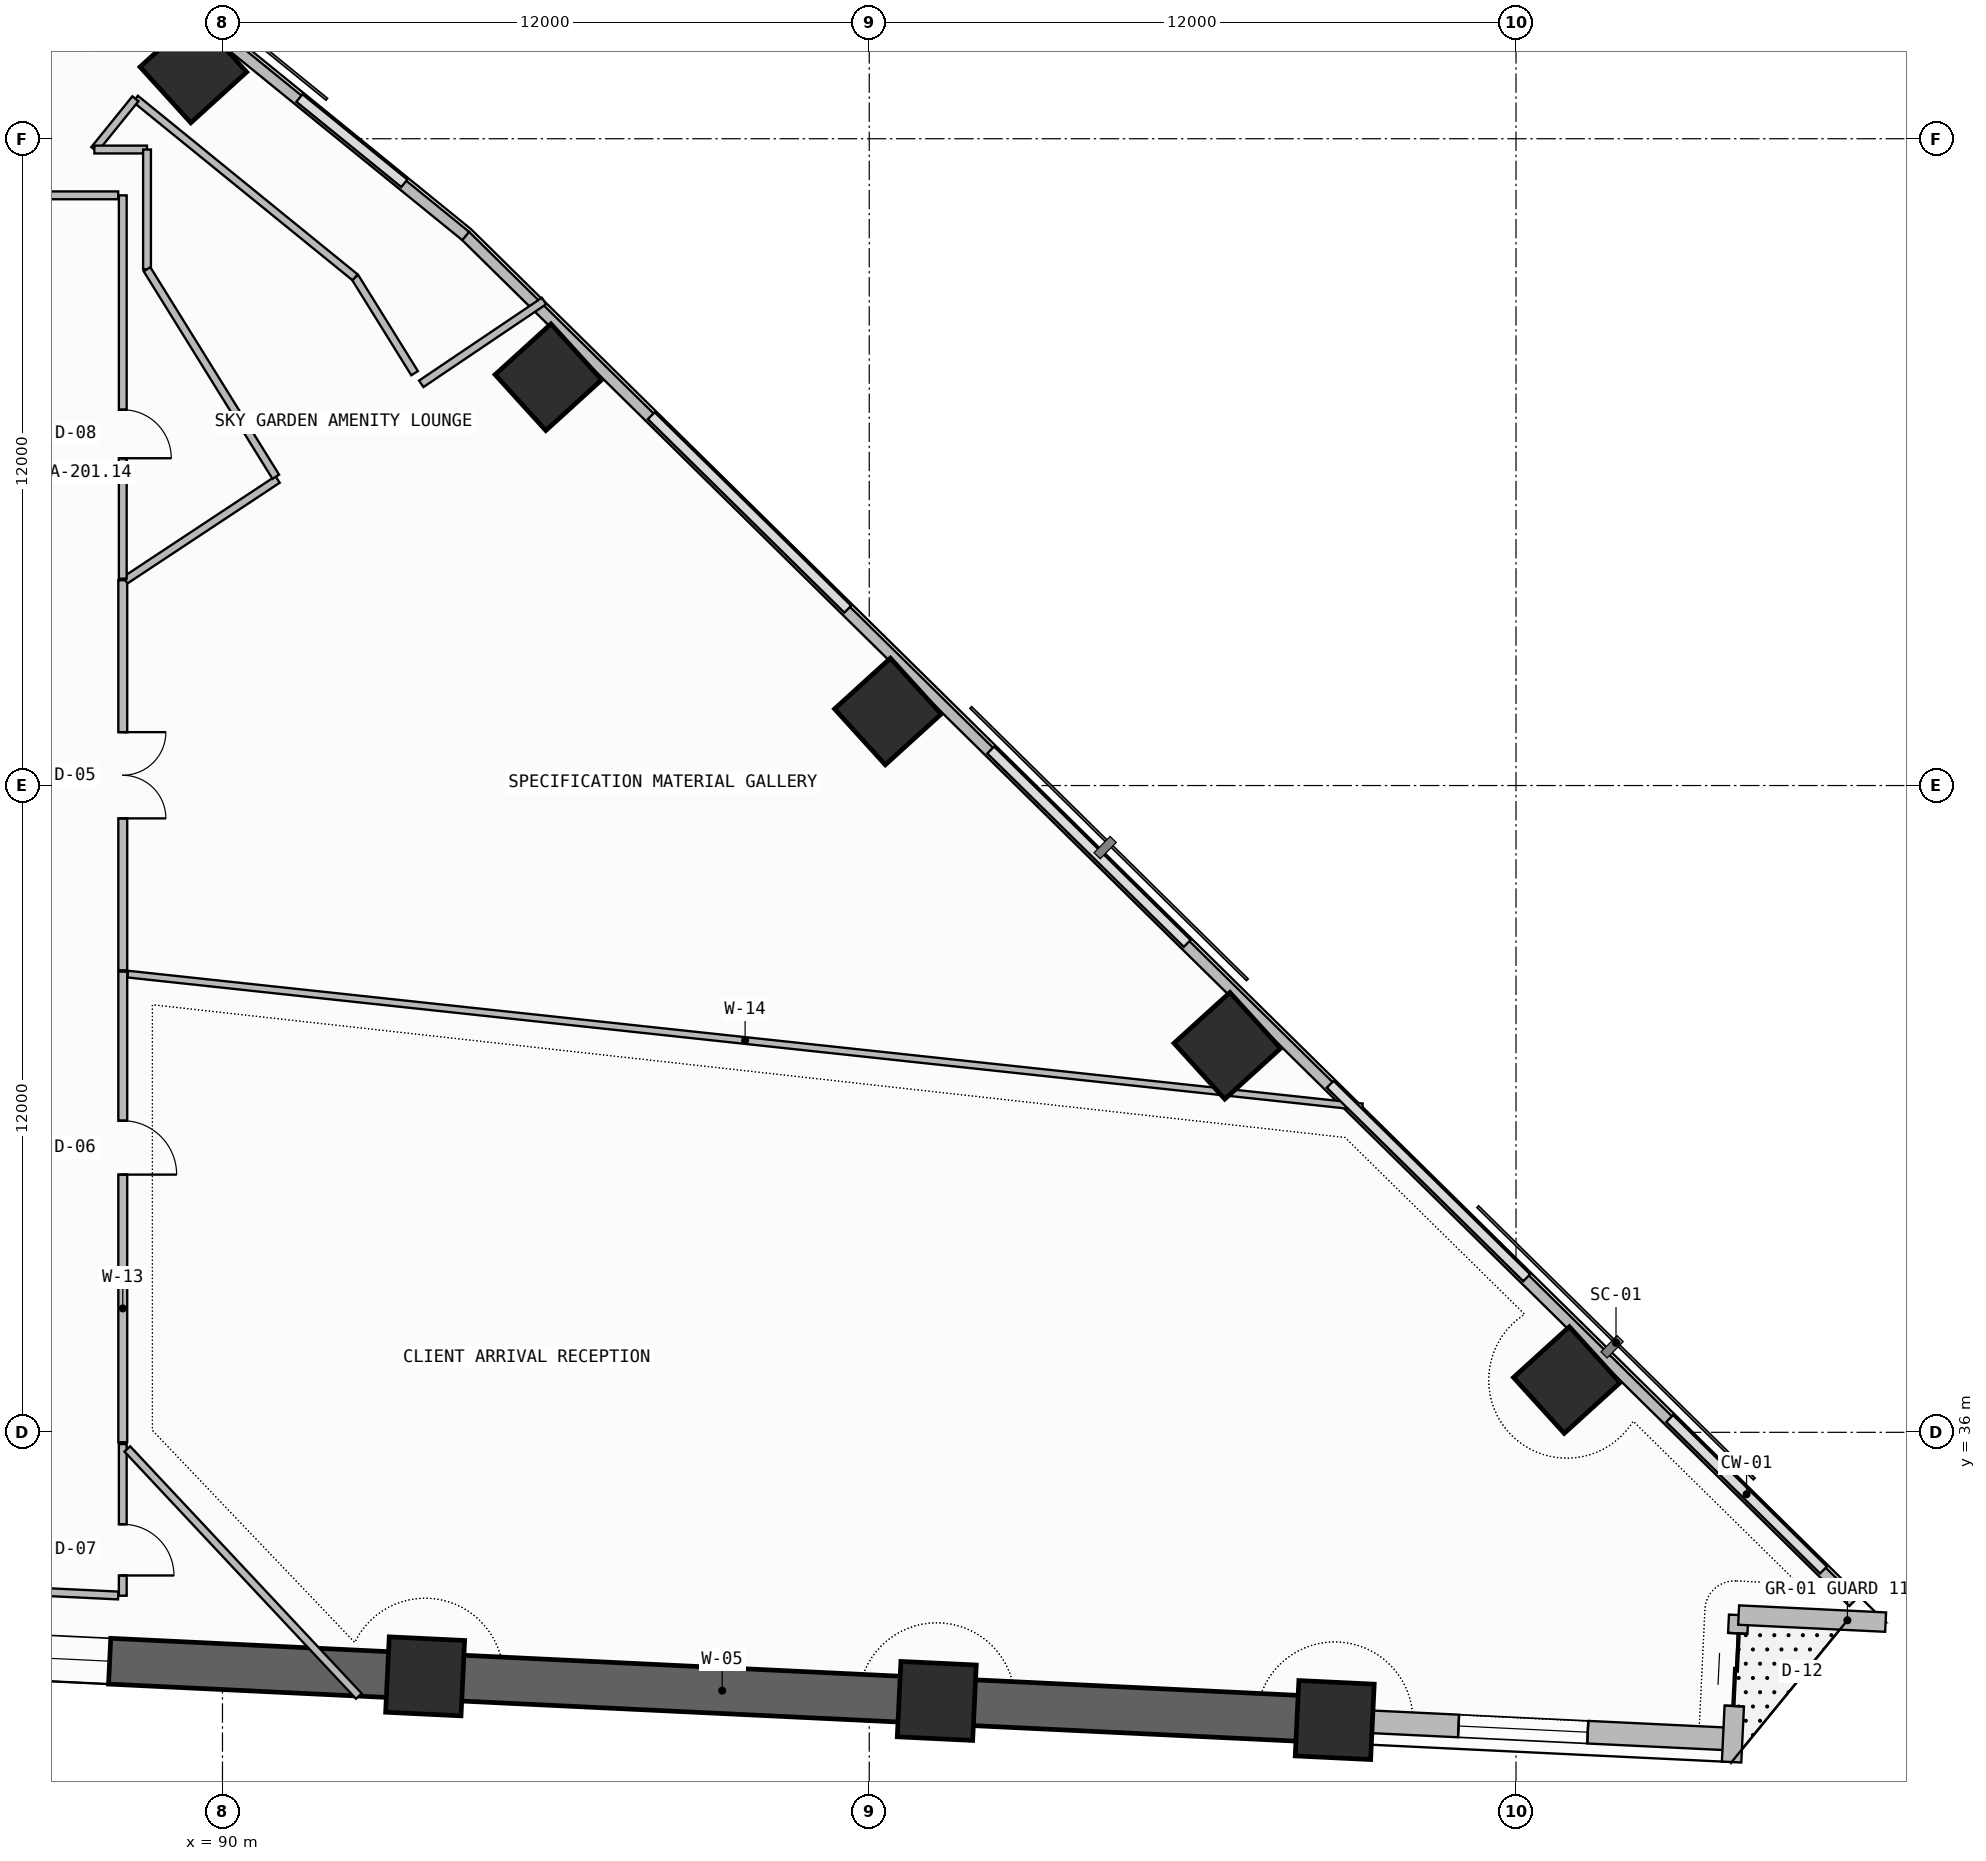
"""IFC4 building model, lengths in metres.
Left out: names, types, materials, properties, quantities, classifications, styles, units other than length and angle.
Written with IfcOpenShell. Run it as: python <this file> out.ifc"""

import sys

from ifc_helpers import new_model, si_unit, direction, frame, frame_2d, origin, origin_2d, place, context, subcontext, project, spatial, rectangle, extrude, element, fill, save


model = new_model("IFC4")
c1 = context("Model", 3, precision=1e-05, world=origin(), true_north=direction((0.0, 1.0)))
c2 = subcontext(c1, "Body", "Model", "MODEL_VIEW")
j1 = project(units=[si_unit("LENGTHUNIT", "METRE"), si_unit("PLANEANGLEUNIT", "RADIAN")], contexts=[c1])
p1 = place(None, origin())
s1 = spatial("IfcSite", under=j1, at=p1, CompositionType="ELEMENT")
p2 = place(p1, origin())
s2 = spatial("IfcBuilding", under=s1, at=p2, CompositionType="ELEMENT")
p3 = place(p2, frame((0.0, 0.0, 48.3)))
s3 = spatial("IfcBuildingStorey", under=s2, at=p3, CompositionType="ELEMENT", Elevation=48.3)
for number, where, z_axis, x_axis in (
    (1, (93.76, 31.472, 0.0), (0.0, 0.0, 1.0), (-0.999, 0.048, 0.0)),
    (2, (103.253, 31.017, 0.0), (0.0, 0.0, 1.0), (-0.999, 0.048, 0.0)),
    (3, (110.636, 30.662, 0.0), (0.0, 0.0, 1.0), (-0.999, 0.048, 0.0)),
    (4, (114.942, 36.97, 0.0), (0.0, 0.0, 1.0), (0.74, 0.672, 0.0)),
    (5, (108.644, 43.172, 0.0), (0.0, 0.0, 1.0), (0.74, 0.672, 0.0)),
    (6, (102.345, 49.374, 0.0), (0.0, 0.0, 1.0), (0.74, 0.672, 0.0)),
    (7, (96.047, 55.576, 0.0), (0.0, 0.0, 1.0), (0.74, 0.672, 0.0)),
    (8, (89.46, 61.285, 0.0), (0.0, 0.0, 1.0), (0.74, 0.672, 0.0)),
):
    element("IfcColumn", number, at=place(p3, frame(where, z_axis=z_axis, x_axis=x_axis)), inside=s3, PredefinedType="COLUMN", context=c2, shape_type="SweptSolid", body=[
        extrude(rectangle(XDim=1.4, YDim=1.4, at=origin_2d()), origin(), (0.0, 0.0, 1.0), 3.6),
    ])
p4 = place(p3, frame((83.212, 31.979, -0.26), z_axis=(0.0, 0.0, 1.0), x_axis=(0.998848235141, -0.047981279227, 0.0)))
e9 = element("IfcWall", 9, at=p4, inside=s3, PredefinedType="SHEAR", context=c2, shape_type="SweptSolid", body=[
    extrude(rectangle(XDim=27.456, YDim=0.85, at=frame_2d((13.728, 0.0))), origin(), (0.0, 0.0, 1.0), 3.66),
])
p5 = place(p4, frame((2.3, 0.0, 1.2)))
e10 = element("IfcOpeningElement", 10, at=p5, cuts=e9, PredefinedType="OPENING", context=c2, shape_type="SweptSolid", body=[
    extrude(rectangle(XDim=2.4, YDim=0.9, at=frame_2d((1.2, 0.45))), frame((0.0, 0.435, 0.0), z_axis=(0.0, -1.0, 0.0), x_axis=(1.0, 0.0, 0.0)), (0.0, 0.0, 1.0), 0.87),
])
p6 = place(p3, frame((110.636, 30.662, 0.0), z_axis=(0.0, 0.0, 1.0), x_axis=(0.998847872759, -0.047988822508, 0.0)))
e11 = element("IfcWall", 11, at=p6, inside=s3, PredefinedType="SOLIDWALL", context=c2, shape_type="SweptSolid", body=[
    extrude(rectangle(XDim=7.392, YDim=0.42, at=frame_2d((3.696, 0.0))), origin(), (0.0, 0.0, 1.0), 2.385),
])
p7 = place(p6, frame((2.3, 0.0, 1.2)))
e12 = element("IfcOpeningElement", 12, at=p7, cuts=e11, PredefinedType="OPENING", context=c2, shape_type="SweptSolid", body=[
    extrude(rectangle(XDim=2.4, YDim=0.9, at=frame_2d((1.2, 0.45))), frame((0.0, 0.22, 0.0), z_axis=(0.0, -1.0, 0.0), x_axis=(1.0, 0.0, 0.0)), (0.0, 0.0, 1.0), 0.44),
])
p8 = place(p3, frame((118.0, 29.883, 0.0), z_axis=(0.0, 0.0, 1.0), x_axis=(0.048024030708, 0.998846180588, 0.0)))
e13 = element("IfcWall", 13, at=p8, inside=s3, PredefinedType="SOLIDWALL", context=c2, shape_type="SweptSolid", body=[
    extrude(rectangle(XDim=2.73, YDim=0.36, at=frame_2d((1.365, 0.0))), origin(), (0.0, 0.0, 1.0), 3.4),
])
p9 = place(p8, frame((1.04, 0.0, 0.0)))
e14 = element("IfcOpeningElement", 14, at=p9, cuts=e13, PredefinedType="OPENING", context=c2, shape_type="SweptSolid", body=[
    extrude(rectangle(XDim=1.35, YDim=2.35, at=frame_2d((0.675, 1.175))), frame((0.0, 0.19, 0.0), z_axis=(0.0, -1.0, 0.0), x_axis=(1.0, 0.0, 0.0)), (0.0, 0.0, 1.0), 0.38),
])
p10 = place(p3, frame((118.131, 32.61, 0.0), z_axis=(0.0, 0.0, 1.0), x_axis=(0.998846180588, -0.048024030708, 0.0)))
e15 = element("IfcWall", 15, at=p10, inside=s3, PredefinedType="SOLIDWALL", context=c2, shape_type="SweptSolid", body=[
    extrude(rectangle(XDim=2.73, YDim=0.36, at=frame_2d((1.365, 0.0))), origin(), (0.0, 0.0, 1.0), 3.4),
])
p11 = place(p3, frame((120.254, 32.848, 0.0), z_axis=(0.0, 0.0, 1.0), x_axis=(-0.71254385441, 0.701627576099, 0.0)))
e16 = element("IfcWall", 16, at=p11, inside=s3, PredefinedType="PARAPET", context=c2, shape_type="SweptSolid", body=[
    extrude(rectangle(XDim=36.142, YDim=0.2, at=frame_2d((18.071, 0.0))), origin(), (0.0, 0.0, 1.0), 1.15),
])
p12 = place(p3, frame((94.513, 58.196, 0.0), z_axis=(0.0, 0.0, 1.0), x_axis=(-0.776001602097, 0.630730935933, 0.0)))
e17 = element("IfcWall", 17, at=p12, inside=s3, PredefinedType="PARAPET", context=c2, shape_type="SweptSolid", body=[
    extrude(rectangle(XDim=36.148, YDim=0.2, at=frame_2d((18.074, 0.0))), origin(), (0.0, 0.0, 1.0), 1.15),
])
p13 = place(p3, frame((88.15, 32.969, 0.0), z_axis=(0.0, 0.0, 1.0), x_axis=(0.0, 1.0, 0.0)))
e18 = element("IfcWall", 18, at=p13, inside=s3, PredefinedType="PARTITIONING", context=c2, shape_type="SweptSolid", body=[
    extrude(rectangle(XDim=2.813, YDim=0.145, at=frame_2d((1.406, 0.0))), origin(), (0.0, 0.0, 1.0), 2.785),
])
p14 = place(p13, frame((0.375, 0.0, 0.0)))
e19 = element("IfcOpeningElement", 19, at=p14, cuts=e18, PredefinedType="OPENING", context=c2, shape_type="SweptSolid", body=[
    extrude(rectangle(XDim=0.95, YDim=2.15, at=frame_2d((0.475, 1.075))), frame((0.0, 0.083, 0.0), z_axis=(0.0, -1.0, 0.0), x_axis=(1.0, 0.0, 0.0)), (0.0, 0.0, 1.0), 0.165),
])
p15 = place(p3, frame((86.3, 33.057, 0.0), z_axis=(0.0, 0.0, 1.0), x_axis=(0.998843945898, -0.048070487232, 0.0)))
e20 = element("IfcWall", 20, at=p15, inside=s3, PredefinedType="PARTITIONING", context=c2, shape_type="SweptSolid", body=[
    extrude(rectangle(XDim=1.767, YDim=0.145, at=frame_2d((0.884, 0.0))), origin(), (0.0, 0.0, 1.0), 3.4),
])
p16 = place(p3, frame((88.235, 35.691, 0.0), z_axis=(0.0, 0.0, 1.0), x_axis=(0.683667039651, -0.729794066086, 0.0)))
e21 = element("IfcWall", 21, at=p16, inside=s3, PredefinedType="PARTITIONING", context=c2, shape_type="SweptSolid", body=[
    extrude(rectangle(XDim=6.282, YDim=0.145, at=frame_2d((3.141, 0.0))), origin(), (0.0, 0.0, 1.0), 2.385),
])
p17 = place(p3, frame((88.15, 35.816, 0.0), z_axis=(0.0, 0.0, 1.0), x_axis=(0.0, 1.0, 0.0)))
e22 = element("IfcWall", 22, at=p17, inside=s3, PredefinedType="PARTITIONING", context=c2, shape_type="SweptSolid", body=[
    extrude(rectangle(XDim=8.731, YDim=0.165, at=frame_2d((4.366, 0.0))), origin(), (0.0, 0.0, 1.0), 2.785),
])
p18 = place(p17, frame((4.965, 0.0, 0.0)))
e23 = element("IfcOpeningElement", 23, at=p18, cuts=e22, PredefinedType="OPENING", context=c2, shape_type="SweptSolid", body=[
    extrude(rectangle(XDim=1.0, YDim=2.2, at=frame_2d((0.5, 1.1))), frame((0.0, 0.093, 0.0), z_axis=(0.0, -1.0, 0.0), x_axis=(1.0, 0.0, 0.0)), (0.0, 0.0, 1.0), 0.185),
])
p19 = place(p3, frame((88.244, 44.501, 0.0), z_axis=(0.0, 0.0, 1.0), x_axis=(0.994268709567, -0.106909930207, 0.0)))
e24 = element("IfcWall", 24, at=p19, inside=s3, PredefinedType="PARTITIONING", context=c2, shape_type="SweptSolid", body=[
    extrude(rectangle(XDim=23.037, YDim=0.125, at=frame_2d((11.519, 0.0))), origin(), (0.0, 0.0, 1.0), 2.785),
])
p20 = place(p3, frame((88.15, 44.572, 0.0), z_axis=(0.0, 0.0, 1.0), x_axis=(0.0, 1.0, 0.0)))
e25 = element("IfcWall", 25, at=p20, inside=s3, PredefinedType="PARTITIONING", context=c2, shape_type="SweptSolid", body=[
    extrude(rectangle(XDim=7.238, YDim=0.165, at=frame_2d((3.619, 0.0))), origin(), (0.0, 0.0, 1.0), 2.785),
])
p21 = place(p20, frame((2.819, 0.0, 0.0)))
e26 = element("IfcOpeningElement", 26, at=p21, cuts=e25, PredefinedType="OPENING", context=c2, shape_type="SweptSolid", body=[
    extrude(rectangle(XDim=1.6, YDim=2.3, at=frame_2d((0.8, 1.15))), frame((0.0, 0.093, 0.0), z_axis=(0.0, -1.0, 0.0), x_axis=(1.0, 0.0, 0.0)), (0.0, 0.0, 1.0), 0.185),
])
p22 = place(p3, frame((88.197, 51.81, 0.0), z_axis=(0.0, 0.0, 1.0), x_axis=(0.834029749889, 0.551719472468, 0.0)))
e27 = element("IfcWall", 27, at=p22, inside=s3, PredefinedType="PARTITIONING", context=c2, shape_type="SweptSolid", body=[
    extrude(rectangle(XDim=3.387, YDim=0.145, at=frame_2d((1.694, 0.0))), origin(), (0.0, 0.0, 1.0), 3.4),
])
p23 = place(p3, frame((93.688, 55.452, 0.0), z_axis=(0.0, 0.0, 1.0), x_axis=(0.82889296356, 0.559407235349, 0.0)))
e28 = element("IfcWall", 28, at=p23, inside=s3, PredefinedType="PARTITIONING", context=c2, shape_type="SweptSolid", body=[
    extrude(rectangle(XDim=2.748, YDim=0.145, at=frame_2d((1.374, 0.0))), origin(), (0.0, 0.0, 1.0), 2.785),
])
p24 = place(p3, frame((88.15, 51.838, 0.0), z_axis=(0.0, 0.0, 1.0), x_axis=(0.0, 1.0, 0.0)))
e29 = element("IfcWall", 29, at=p24, inside=s3, PredefinedType="PARTITIONING", context=c2, shape_type="SweptSolid", body=[
    extrude(rectangle(XDim=7.112, YDim=0.145, at=frame_2d((3.556, 0.0))), origin(), (0.0, 0.0, 1.0), 3.4),
])
p25 = place(p24, frame((2.234, 0.0, 0.0)))
e30 = element("IfcOpeningElement", 30, at=p25, cuts=e29, PredefinedType="OPENING", context=c2, shape_type="SweptSolid", body=[
    extrude(rectangle(XDim=0.9, YDim=2.1, at=frame_2d((0.45, 1.05))), frame((0.0, 0.083, 0.0), z_axis=(0.0, -1.0, 0.0), x_axis=(1.0, 0.0, 0.0)), (0.0, 0.0, 1.0), 0.165),
])
p26 = place(p3, frame((88.065, 58.95, 0.0), z_axis=(0.0, 0.0, 1.0), x_axis=(-1.0, 0.0, 0.0)))
e31 = element("IfcWall", 31, at=p26, inside=s3, PredefinedType="PARTITIONING", context=c2, shape_type="SweptSolid", body=[
    extrude(rectangle(XDim=5.336, YDim=0.145, at=frame_2d((2.668, 0.0))), origin(), (0.0, 0.0, 1.0), 2.785),
])
p27 = place(p3, frame((93.565, 55.65, 0.0), z_axis=(0.0, 0.0, 1.0), x_axis=(-0.527618202131, 0.849481625923, 0.0)))
e32 = element("IfcWall", 32, at=p27, inside=s3, PredefinedType="PARTITIONING", context=c2, shape_type="SweptSolid", body=[
    extrude(rectangle(XDim=2.094, YDim=0.145, at=frame_2d((1.047, 0.0))), origin(), (0.0, 0.0, 1.0), 3.4),
])
p28 = place(p3, frame((92.46, 57.429, 0.0), z_axis=(0.0, 0.0, 1.0), x_axis=(-0.775983159792, 0.630753625213, 0.0)))
e33 = element("IfcWall", 33, at=p28, inside=s3, PredefinedType="PARTITIONING", context=c2, shape_type="SweptSolid", body=[
    extrude(rectangle(XDim=5.252, YDim=0.145, at=frame_2d((2.626, 0.0))), origin(), (0.0, 0.0, 1.0), 3.4),
])
p29 = place(p3, frame((88.385, 60.742, 0.0), z_axis=(0.0, 0.0, 1.0), x_axis=(-0.628914048691, -0.777474835193, 0.0)))
e34 = element("IfcWall", 34, at=p29, inside=s3, PredefinedType="PARTITIONING", context=c2, shape_type="SweptSolid", body=[
    extrude(rectangle(XDim=1.211, YDim=0.145, at=frame_2d((0.605, 0.0))), origin(), (0.0, 0.0, 1.0), 3.4),
])
p30 = place(p3, frame((87.623, 59.8, 0.0), z_axis=(0.0, 0.0, 1.0), x_axis=(1.0, 0.0, 0.0)))
e35 = element("IfcWall", 35, at=p30, inside=s3, PredefinedType="PARTITIONING", context=c2, shape_type="SweptSolid", body=[
    extrude(rectangle(XDim=0.977, YDim=0.145, at=frame_2d((0.489, 0.0))), origin(), (0.0, 0.0, 1.0), 3.4),
])
p31 = place(p3, frame((88.6, 59.8, 0.0), z_axis=(0.0, 0.0, 1.0), x_axis=(0.0, -1.0, 0.0)))
e36 = element("IfcWall", 36, at=p31, inside=s3, PredefinedType="PARTITIONING", context=c2, shape_type="SweptSolid", body=[
    extrude(rectangle(XDim=2.222, YDim=0.145, at=frame_2d((1.111, 0.0))), origin(), (0.0, 0.0, 1.0), 3.4),
])
p32 = place(p3, frame((88.6, 57.578, 0.0), z_axis=(0.0, 0.0, 1.0), x_axis=(0.527337377714, -0.849655983363, 0.0)))
e37 = element("IfcWall", 37, at=p32, inside=s3, PredefinedType="PARTITIONING", context=c2, shape_type="SweptSolid", body=[
    extrude(rectangle(XDim=4.531, YDim=0.145, at=frame_2d((2.266, 0.0))), origin(), (0.0, 0.0, 1.0), 3.4),
])
p33 = place(p5, origin())
e38 = element("IfcWindow", 38, at=p33, inside=s3, PartitioningType="SINGLE_PANEL", PredefinedType="WINDOW", context=c2, shape_type="SweptSolid", body=[
    extrude(rectangle(XDim=2.4, YDim=0.9, at=frame_2d((1.2, 0.45))), frame((0.0, 0.03, 0.0), z_axis=(0.0, -1.0, 0.0), x_axis=(1.0, 0.0, 0.0)), (0.0, 0.0, 1.0), 0.06),
])
fill(e10, e38)
p34 = place(p7, origin())
e39 = element("IfcWindow", 39, at=p34, inside=s3, PartitioningType="SINGLE_PANEL", PredefinedType="WINDOW", context=c2, shape_type="SweptSolid", body=[
    extrude(rectangle(XDim=2.4, YDim=0.9, at=frame_2d((1.2, 0.45))), frame((0.0, 0.03, 0.0), z_axis=(0.0, -1.0, 0.0), x_axis=(1.0, 0.0, 0.0)), (0.0, 0.0, 1.0), 0.06),
])
fill(e12, e39)
p35 = place(p9, origin())
e40 = element("IfcDoor", 40, at=p35, inside=s3, OperationType="DOUBLE_DOOR_SLIDING", PredefinedType="DOOR", context=c2, shape_type="SweptSolid", body=[
    extrude(rectangle(XDim=1.35, YDim=2.35, at=frame_2d((0.675, 1.175))), frame((0.0, 0.025, 0.0), z_axis=(0.0, -1.0, 0.0), x_axis=(1.0, 0.0, 0.0)), (0.0, 0.0, 1.0), 0.05),
])
fill(e14, e40)
p36 = place(p14, frame((0.95, 0.0, 0.0), z_axis=(0.0, 0.0, 1.0), x_axis=(-1.0, 0.0, 0.0)))
e41 = element("IfcDoor", 41, at=p36, inside=s3, OperationType="SINGLE_SWING_RIGHT", PredefinedType="DOOR", context=c2, shape_type="SweptSolid", body=[
    extrude(rectangle(XDim=0.95, YDim=2.15, at=frame_2d((0.475, 1.075))), frame((0.0, 0.025, 0.0), z_axis=(0.0, -1.0, 0.0), x_axis=(1.0, 0.0, 0.0)), (0.0, 0.0, 1.0), 0.05),
])
fill(e19, e41)
p37 = place(p18, frame((1.0, 0.0, 0.0), z_axis=(0.0, 0.0, 1.0), x_axis=(-1.0, 0.0, 0.0)))
e42 = element("IfcDoor", 42, at=p37, inside=s3, OperationType="SINGLE_SWING_RIGHT", PredefinedType="DOOR", context=c2, shape_type="SweptSolid", body=[
    extrude(rectangle(XDim=1.0, YDim=2.2, at=frame_2d((0.5, 1.1))), frame((0.0, 0.025, 0.0), z_axis=(0.0, -1.0, 0.0), x_axis=(1.0, 0.0, 0.0)), (0.0, 0.0, 1.0), 0.05),
])
fill(e23, e42)
p38 = place(p21, frame((1.6, 0.0, 0.0), z_axis=(0.0, 0.0, 1.0), x_axis=(-1.0, 0.0, 0.0)))
e43 = element("IfcDoor", 43, at=p38, inside=s3, OperationType="DOUBLE_DOOR_SINGLE_SWING", PredefinedType="DOOR", context=c2, shape_type="SweptSolid", body=[
    extrude(rectangle(XDim=1.6, YDim=2.3, at=frame_2d((0.8, 1.15))), frame((0.0, 0.025, 0.0), z_axis=(0.0, -1.0, 0.0), x_axis=(1.0, 0.0, 0.0)), (0.0, 0.0, 1.0), 0.05),
])
fill(e26, e43)
p39 = place(p25, frame((0.9, 0.0, 0.0), z_axis=(0.0, 0.0, 1.0), x_axis=(-1.0, 0.0, 0.0)))
e44 = element("IfcDoor", 44, at=p39, inside=s3, OperationType="SINGLE_SWING_RIGHT", PredefinedType="DOOR", context=c2, shape_type="SweptSolid", body=[
    extrude(rectangle(XDim=0.9, YDim=2.1, at=frame_2d((0.45, 1.05))), frame((0.0, 0.025, 0.0), z_axis=(0.0, -1.0, 0.0), x_axis=(1.0, 0.0, 0.0)), (0.0, 0.0, 1.0), 0.05),
])
fill(e30, e44)
save(model, sys.argv[1])
